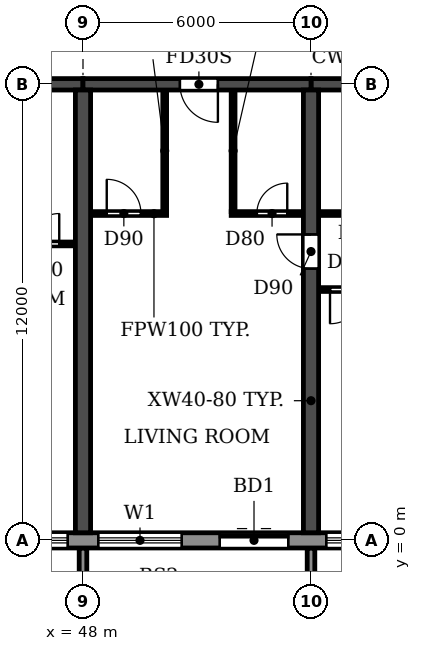
"""IFC4 building model, lengths in metres.
Left out: names, types, materials, properties, quantities, classifications, styles, units other than length and angle.
Written with IfcOpenShell. Run it as: python <this file> out.ifc"""

import sys

from ifc_helpers import new_model, si_unit, direction, frame, frame_2d, origin, place, context, subcontext, project, spatial, polyline, rectangle, outline, extrude, source, transform, mapped, element, fill, save


model = new_model("IFC4")
c1 = context("Model", 3, precision=1e-05, world=origin(), true_north=direction((0.0, 1.0)))
c2 = subcontext(c1, "Body", "Model", "MODEL_VIEW")
j1 = project(units=[si_unit("LENGTHUNIT", "METRE"), si_unit("PLANEANGLEUNIT", "RADIAN")], contexts=[c1])
p1 = place(None, origin())
s1 = spatial("IfcSite", under=j1, at=p1, CompositionType="ELEMENT")
p2 = place(p1, origin())
s2 = spatial("IfcBuilding", under=s1, at=p2, CompositionType="ELEMENT")
p3 = place(p2, frame((0.0, 0.0, 33.3)))
s3 = spatial("IfcBuildingStorey", under=s2, at=p3, CompositionType="ELEMENT", Elevation=33.3)
p4 = place(p3, frame((48.0, 0.2, 0.0), z_axis=(0.0, 0.0, 1.0), x_axis=(0.0, 1.0, 0.0)))
e1 = element("IfcWall", 1, at=p4, inside=s3, PredefinedType="SHEAR", context=c2, shape_type="SweptSolid", body=[
    extrude(rectangle(XDim=11.65, YDim=0.4, at=frame_2d((5.825, 0.0))), origin(), (0.0, 0.0, 1.0), 3.05),
])
p5 = place(p3, frame((54.0, 0.2, 0.0), z_axis=(0.0, 0.0, 1.0), x_axis=(0.0, 1.0, 0.0)))
e2 = element("IfcWall", 2, at=p5, inside=s3, PredefinedType="SHEAR", context=c2, shape_type="SweptSolid", body=[
    extrude(rectangle(XDim=11.65, YDim=0.4, at=frame_2d((5.825, 0.0))), origin(), (0.0, 0.0, 1.0), 3.05),
])
p6 = place(p5, frame((6.95, 0.0, 0.0)))
e3 = element("IfcOpeningElement", 3, at=p6, cuts=e2, PredefinedType="OPENING", context=c2, shape_type="SweptSolid", body=[
    extrude(rectangle(XDim=0.9, YDim=2.1, at=frame_2d((0.45, 1.05))), frame((0.0, 0.21, 0.0), z_axis=(0.0, -1.0, 0.0), x_axis=(1.0, 0.0, 0.0)), (0.0, 0.0, 1.0), 0.42),
])
p7 = place(p3, frame((42.0, 12.0, 0.0), z_axis=(0.0, 0.0, 1.0), x_axis=(1.0, 0.0, 0.0)))
e4 = element("IfcWall", 4, at=p7, inside=s3, PredefinedType="SHEAR", context=c2, shape_type="SweptSolid", body=[
    extrude(rectangle(XDim=6.0, YDim=0.3, at=frame_2d((3.0, 0.0))), origin(), (0.0, 0.0, 1.0), 2.45),
])
p8 = place(p7, frame((2.55, 0.0, 0.0)))
e5 = element("IfcOpeningElement", 5, at=p8, cuts=e4, PredefinedType="OPENING", context=c2, shape_type="SweptSolid", body=[
    extrude(rectangle(XDim=1.0, YDim=2.1, at=frame_2d((0.5, 1.05))), frame((0.0, 0.16, 0.0), z_axis=(0.0, -1.0, 0.0), x_axis=(1.0, 0.0, 0.0)), (0.0, 0.0, 1.0), 0.32),
])
p9 = place(p3, frame((48.0, 12.0, 0.0), z_axis=(0.0, 0.0, 1.0), x_axis=(1.0, 0.0, 0.0)))
e6 = element("IfcWall", 6, at=p9, inside=s3, PredefinedType="SHEAR", context=c2, shape_type="SweptSolid", body=[
    extrude(rectangle(XDim=6.0, YDim=0.3, at=frame_2d((3.0, 0.0))), origin(), (0.0, 0.0, 1.0), 2.45),
])
p10 = place(p9, frame((2.55, 0.0, 0.0)))
e7 = element("IfcOpeningElement", 7, at=p10, cuts=e6, PredefinedType="OPENING", context=c2, shape_type="SweptSolid", body=[
    extrude(rectangle(XDim=1.0, YDim=2.1, at=frame_2d((0.5, 1.05))), frame((0.0, 0.16, 0.0), z_axis=(0.0, -1.0, 0.0), x_axis=(1.0, 0.0, 0.0)), (0.0, 0.0, 1.0), 0.32),
])
p11 = place(p3, frame((54.0, 12.0, 0.0), z_axis=(0.0, 0.0, 1.0), x_axis=(1.0, 0.0, 0.0)))
e8 = element("IfcWall", 8, at=p11, inside=s3, PredefinedType="SHEAR", context=c2, shape_type="SweptSolid", body=[
    extrude(rectangle(XDim=6.0, YDim=0.3, at=frame_2d((3.0, 0.0))), origin(), (0.0, 0.0, 1.0), 2.45),
])
p12 = place(p3, frame((4.683, 0.0, 0.0), z_axis=(0.0, 0.0, 1.0), x_axis=(1.0, 0.0, 0.0)))
e9 = element("IfcWall", 9, at=p12, inside=s3, PredefinedType="STANDARD", context=c2, shape_type="SweptSolid", body=[
    extrude(rectangle(XDim=92.634, YDim=0.4, at=frame_2d((46.317, 0.0))), origin(), (0.0, 0.0, 1.0), 3.05),
])
p13 = place(p12, frame((1.717, 0.0, 0.9)))
e10 = element("IfcOpeningElement", 10, at=p13, cuts=e9, PredefinedType="OPENING", context=c2, shape_type="SweptSolid", body=[
    extrude(rectangle(XDim=2.2, YDim=1.5, at=frame_2d((1.1, 0.75))), frame((0.0, 0.21, 0.0), z_axis=(0.0, -1.0, 0.0), x_axis=(1.0, 0.0, 0.0)), (0.0, 0.0, 1.0), 0.42),
])
p14 = place(p12, frame((4.717, 0.0, 0.9)))
e11 = element("IfcOpeningElement", 11, at=p14, cuts=e9, PredefinedType="OPENING", context=c2, shape_type="SweptSolid", body=[
    extrude(rectangle(XDim=2.2, YDim=1.5, at=frame_2d((1.1, 0.75))), frame((0.0, 0.21, 0.0), z_axis=(0.0, -1.0, 0.0), x_axis=(1.0, 0.0, 0.0)), (0.0, 0.0, 1.0), 0.42),
])
p15 = place(p12, frame((7.917, 0.0, 0.0)))
e12 = element("IfcOpeningElement", 12, at=p15, cuts=e9, PredefinedType="OPENING", context=c2, shape_type="SweptSolid", body=[
    extrude(rectangle(XDim=1.8, YDim=2.4, at=frame_2d((0.9, 1.2))), frame((0.0, 0.21, 0.0), z_axis=(0.0, -1.0, 0.0), x_axis=(1.0, 0.0, 0.0)), (0.0, 0.0, 1.0), 0.42),
])
p16 = place(p12, frame((10.717, 0.0, 0.9)))
e13 = element("IfcOpeningElement", 13, at=p16, cuts=e9, PredefinedType="OPENING", context=c2, shape_type="SweptSolid", body=[
    extrude(rectangle(XDim=2.2, YDim=1.5, at=frame_2d((1.1, 0.75))), frame((0.0, 0.21, 0.0), z_axis=(0.0, -1.0, 0.0), x_axis=(1.0, 0.0, 0.0)), (0.0, 0.0, 1.0), 0.42),
])
p17 = place(p12, frame((13.717, 0.0, 0.9)))
e14 = element("IfcOpeningElement", 14, at=p17, cuts=e9, PredefinedType="OPENING", context=c2, shape_type="SweptSolid", body=[
    extrude(rectangle(XDim=2.2, YDim=1.5, at=frame_2d((1.1, 0.75))), frame((0.0, 0.21, 0.0), z_axis=(0.0, -1.0, 0.0), x_axis=(1.0, 0.0, 0.0)), (0.0, 0.0, 1.0), 0.42),
])
p18 = place(p12, frame((16.717, 0.0, 0.9)))
e15 = element("IfcOpeningElement", 15, at=p18, cuts=e9, PredefinedType="OPENING", context=c2, shape_type="SweptSolid", body=[
    extrude(rectangle(XDim=2.2, YDim=1.5, at=frame_2d((1.1, 0.75))), frame((0.0, 0.21, 0.0), z_axis=(0.0, -1.0, 0.0), x_axis=(1.0, 0.0, 0.0)), (0.0, 0.0, 1.0), 0.42),
])
p19 = place(p12, frame((19.717, 0.0, 0.9)))
e16 = element("IfcOpeningElement", 16, at=p19, cuts=e9, PredefinedType="OPENING", context=c2, shape_type="SweptSolid", body=[
    extrude(rectangle(XDim=2.2, YDim=1.5, at=frame_2d((1.1, 0.75))), frame((0.0, 0.21, 0.0), z_axis=(0.0, -1.0, 0.0), x_axis=(1.0, 0.0, 0.0)), (0.0, 0.0, 1.0), 0.42),
])
p20 = place(p12, frame((22.917, 0.0, 0.0)))
e17 = element("IfcOpeningElement", 17, at=p20, cuts=e9, PredefinedType="OPENING", context=c2, shape_type="SweptSolid", body=[
    extrude(rectangle(XDim=1.8, YDim=2.4, at=frame_2d((0.9, 1.2))), frame((0.0, 0.21, 0.0), z_axis=(0.0, -1.0, 0.0), x_axis=(1.0, 0.0, 0.0)), (0.0, 0.0, 1.0), 0.42),
])
p21 = place(p12, frame((25.717, 0.0, 0.9)))
e18 = element("IfcOpeningElement", 18, at=p21, cuts=e9, PredefinedType="OPENING", context=c2, shape_type="SweptSolid", body=[
    extrude(rectangle(XDim=2.2, YDim=1.5, at=frame_2d((1.1, 0.75))), frame((0.0, 0.21, 0.0), z_axis=(0.0, -1.0, 0.0), x_axis=(1.0, 0.0, 0.0)), (0.0, 0.0, 1.0), 0.42),
])
p22 = place(p12, frame((28.717, 0.0, 0.9)))
e19 = element("IfcOpeningElement", 19, at=p22, cuts=e9, PredefinedType="OPENING", context=c2, shape_type="SweptSolid", body=[
    extrude(rectangle(XDim=2.2, YDim=1.5, at=frame_2d((1.1, 0.75))), frame((0.0, 0.21, 0.0), z_axis=(0.0, -1.0, 0.0), x_axis=(1.0, 0.0, 0.0)), (0.0, 0.0, 1.0), 0.42),
])
p23 = place(p12, frame((31.717, 0.0, 0.9)))
e20 = element("IfcOpeningElement", 20, at=p23, cuts=e9, PredefinedType="OPENING", context=c2, shape_type="SweptSolid", body=[
    extrude(rectangle(XDim=2.2, YDim=1.5, at=frame_2d((1.1, 0.75))), frame((0.0, 0.21, 0.0), z_axis=(0.0, -1.0, 0.0), x_axis=(1.0, 0.0, 0.0)), (0.0, 0.0, 1.0), 0.42),
])
p24 = place(p12, frame((34.717, 0.0, 0.9)))
e21 = element("IfcOpeningElement", 21, at=p24, cuts=e9, PredefinedType="OPENING", context=c2, shape_type="SweptSolid", body=[
    extrude(rectangle(XDim=2.2, YDim=1.5, at=frame_2d((1.1, 0.75))), frame((0.0, 0.21, 0.0), z_axis=(0.0, -1.0, 0.0), x_axis=(1.0, 0.0, 0.0)), (0.0, 0.0, 1.0), 0.42),
])
p25 = place(p12, frame((37.717, 0.0, 0.9)))
e22 = element("IfcOpeningElement", 22, at=p25, cuts=e9, PredefinedType="OPENING", context=c2, shape_type="SweptSolid", body=[
    extrude(rectangle(XDim=2.2, YDim=1.5, at=frame_2d((1.1, 0.75))), frame((0.0, 0.21, 0.0), z_axis=(0.0, -1.0, 0.0), x_axis=(1.0, 0.0, 0.0)), (0.0, 0.0, 1.0), 0.42),
])
p26 = place(p12, frame((40.717, 0.0, 0.9)))
e23 = element("IfcOpeningElement", 23, at=p26, cuts=e9, PredefinedType="OPENING", context=c2, shape_type="SweptSolid", body=[
    extrude(rectangle(XDim=2.2, YDim=1.5, at=frame_2d((1.1, 0.75))), frame((0.0, 0.21, 0.0), z_axis=(0.0, -1.0, 0.0), x_axis=(1.0, 0.0, 0.0)), (0.0, 0.0, 1.0), 0.42),
])
p27 = place(p12, frame((43.717, 0.0, 0.9)))
e24 = element("IfcOpeningElement", 24, at=p27, cuts=e9, PredefinedType="OPENING", context=c2, shape_type="SweptSolid", body=[
    extrude(rectangle(XDim=2.2, YDim=1.5, at=frame_2d((1.1, 0.75))), frame((0.0, 0.21, 0.0), z_axis=(0.0, -1.0, 0.0), x_axis=(1.0, 0.0, 0.0)), (0.0, 0.0, 1.0), 0.42),
])
p28 = place(p12, frame((46.917, 0.0, 0.0)))
e25 = element("IfcOpeningElement", 25, at=p28, cuts=e9, PredefinedType="OPENING", context=c2, shape_type="SweptSolid", body=[
    extrude(rectangle(XDim=1.8, YDim=2.4, at=frame_2d((0.9, 1.2))), frame((0.0, 0.21, 0.0), z_axis=(0.0, -1.0, 0.0), x_axis=(1.0, 0.0, 0.0)), (0.0, 0.0, 1.0), 0.42),
])
p29 = place(p12, frame((49.717, 0.0, 0.9)))
e26 = element("IfcOpeningElement", 26, at=p29, cuts=e9, PredefinedType="OPENING", context=c2, shape_type="SweptSolid", body=[
    extrude(rectangle(XDim=2.2, YDim=1.5, at=frame_2d((1.1, 0.75))), frame((0.0, 0.21, 0.0), z_axis=(0.0, -1.0, 0.0), x_axis=(1.0, 0.0, 0.0)), (0.0, 0.0, 1.0), 0.42),
])
p30 = place(p12, frame((52.717, 0.0, 0.9)))
e27 = element("IfcOpeningElement", 27, at=p30, cuts=e9, PredefinedType="OPENING", context=c2, shape_type="SweptSolid", body=[
    extrude(rectangle(XDim=2.2, YDim=1.5, at=frame_2d((1.1, 0.75))), frame((0.0, 0.21, 0.0), z_axis=(0.0, -1.0, 0.0), x_axis=(1.0, 0.0, 0.0)), (0.0, 0.0, 1.0), 0.42),
])
p31 = place(p12, frame((55.717, 0.0, 0.9)))
e28 = element("IfcOpeningElement", 28, at=p31, cuts=e9, PredefinedType="OPENING", context=c2, shape_type="SweptSolid", body=[
    extrude(rectangle(XDim=2.2, YDim=1.5, at=frame_2d((1.1, 0.75))), frame((0.0, 0.21, 0.0), z_axis=(0.0, -1.0, 0.0), x_axis=(1.0, 0.0, 0.0)), (0.0, 0.0, 1.0), 0.42),
])
p32 = place(p12, frame((58.917, 0.0, 0.0)))
e29 = element("IfcOpeningElement", 29, at=p32, cuts=e9, PredefinedType="OPENING", context=c2, shape_type="SweptSolid", body=[
    extrude(rectangle(XDim=1.8, YDim=2.4, at=frame_2d((0.9, 1.2))), frame((0.0, 0.21, 0.0), z_axis=(0.0, -1.0, 0.0), x_axis=(1.0, 0.0, 0.0)), (0.0, 0.0, 1.0), 0.42),
])
p33 = place(p12, frame((61.717, 0.0, 0.9)))
e30 = element("IfcOpeningElement", 30, at=p33, cuts=e9, PredefinedType="OPENING", context=c2, shape_type="SweptSolid", body=[
    extrude(rectangle(XDim=2.2, YDim=1.5, at=frame_2d((1.1, 0.75))), frame((0.0, 0.21, 0.0), z_axis=(0.0, -1.0, 0.0), x_axis=(1.0, 0.0, 0.0)), (0.0, 0.0, 1.0), 0.42),
])
p34 = place(p12, frame((64.717, 0.0, 0.9)))
e31 = element("IfcOpeningElement", 31, at=p34, cuts=e9, PredefinedType="OPENING", context=c2, shape_type="SweptSolid", body=[
    extrude(rectangle(XDim=2.2, YDim=1.5, at=frame_2d((1.1, 0.75))), frame((0.0, 0.21, 0.0), z_axis=(0.0, -1.0, 0.0), x_axis=(1.0, 0.0, 0.0)), (0.0, 0.0, 1.0), 0.42),
])
p35 = place(p12, frame((67.717, 0.0, 0.9)))
e32 = element("IfcOpeningElement", 32, at=p35, cuts=e9, PredefinedType="OPENING", context=c2, shape_type="SweptSolid", body=[
    extrude(rectangle(XDim=2.2, YDim=1.5, at=frame_2d((1.1, 0.75))), frame((0.0, 0.21, 0.0), z_axis=(0.0, -1.0, 0.0), x_axis=(1.0, 0.0, 0.0)), (0.0, 0.0, 1.0), 0.42),
])
p36 = place(p12, frame((70.917, 0.0, 0.0)))
e33 = element("IfcOpeningElement", 33, at=p36, cuts=e9, PredefinedType="OPENING", context=c2, shape_type="SweptSolid", body=[
    extrude(rectangle(XDim=1.8, YDim=2.4, at=frame_2d((0.9, 1.2))), frame((0.0, 0.21, 0.0), z_axis=(0.0, -1.0, 0.0), x_axis=(1.0, 0.0, 0.0)), (0.0, 0.0, 1.0), 0.42),
])
p37 = place(p12, frame((73.717, 0.0, 0.9)))
e34 = element("IfcOpeningElement", 34, at=p37, cuts=e9, PredefinedType="OPENING", context=c2, shape_type="SweptSolid", body=[
    extrude(rectangle(XDim=2.2, YDim=1.5, at=frame_2d((1.1, 0.75))), frame((0.0, 0.21, 0.0), z_axis=(0.0, -1.0, 0.0), x_axis=(1.0, 0.0, 0.0)), (0.0, 0.0, 1.0), 0.42),
])
p38 = place(p12, frame((76.717, 0.0, 0.9)))
e35 = element("IfcOpeningElement", 35, at=p38, cuts=e9, PredefinedType="OPENING", context=c2, shape_type="SweptSolid", body=[
    extrude(rectangle(XDim=2.2, YDim=1.5, at=frame_2d((1.1, 0.75))), frame((0.0, 0.21, 0.0), z_axis=(0.0, -1.0, 0.0), x_axis=(1.0, 0.0, 0.0)), (0.0, 0.0, 1.0), 0.42),
])
p39 = place(p12, frame((79.717, 0.0, 0.9)))
e36 = element("IfcOpeningElement", 36, at=p39, cuts=e9, PredefinedType="OPENING", context=c2, shape_type="SweptSolid", body=[
    extrude(rectangle(XDim=2.2, YDim=1.5, at=frame_2d((1.1, 0.75))), frame((0.0, 0.21, 0.0), z_axis=(0.0, -1.0, 0.0), x_axis=(1.0, 0.0, 0.0)), (0.0, 0.0, 1.0), 0.42),
])
p40 = place(p12, frame((82.717, 0.0, 0.9)))
e37 = element("IfcOpeningElement", 37, at=p40, cuts=e9, PredefinedType="OPENING", context=c2, shape_type="SweptSolid", body=[
    extrude(rectangle(XDim=2.2, YDim=1.5, at=frame_2d((1.1, 0.75))), frame((0.0, 0.21, 0.0), z_axis=(0.0, -1.0, 0.0), x_axis=(1.0, 0.0, 0.0)), (0.0, 0.0, 1.0), 0.42),
])
p41 = place(p12, frame((85.717, 0.0, 0.9)))
e38 = element("IfcOpeningElement", 38, at=p41, cuts=e9, PredefinedType="OPENING", context=c2, shape_type="SweptSolid", body=[
    extrude(rectangle(XDim=2.2, YDim=1.5, at=frame_2d((1.1, 0.75))), frame((0.0, 0.21, 0.0), z_axis=(0.0, -1.0, 0.0), x_axis=(1.0, 0.0, 0.0)), (0.0, 0.0, 1.0), 0.42),
])
p42 = place(p12, frame((88.717, 0.0, 0.9)))
e39 = element("IfcOpeningElement", 39, at=p42, cuts=e9, PredefinedType="OPENING", context=c2, shape_type="SweptSolid", body=[
    extrude(rectangle(XDim=2.2, YDim=1.5, at=frame_2d((1.1, 0.75))), frame((0.0, 0.21, 0.0), z_axis=(0.0, -1.0, 0.0), x_axis=(1.0, 0.0, 0.0)), (0.0, 0.0, 1.0), 0.42),
])
m1 = source(origin(), c2, "Body", "SweptSolid", [
    extrude(outline(polyline([(0.0, 0.0), (0.2, 0.0), (0.2, 1.65), (0.0, 1.65), (0.0, 0.0)])), origin(), (0.0, 0.0, 1.0), 3.1),
])
for number, where in (
    (40, (47.9, -1.85, 0.0)),
    (41, (53.9, -1.85, 0.0)),
):
    element("IfcWall", number, at=place(p3, frame(where)), inside=s3, PredefinedType="STANDARD", context=c2, shape_type="MappedRepresentation", body=[
        mapped(m1, transform((0.0, 0.0, 0.0))),
    ])
p43 = place(p3, frame((54.21, 6.6, 0.0), z_axis=(0.0, 0.0, 1.0), x_axis=(1.0, 0.0, 0.0)))
e42 = element("IfcWall", 42, at=p43, inside=s3, PredefinedType="PARTITIONING", context=c2, shape_type="SweptSolid", body=[
    extrude(rectangle(XDim=2.69, YDim=0.1, at=frame_2d((1.345, 0.0))), origin(), (0.0, 0.0, 1.0), 3.05),
])
p44 = place(p43, frame((0.29, 0.0, 0.0)))
e43 = element("IfcOpeningElement", 43, at=p44, cuts=e42, PredefinedType="OPENING", context=c2, shape_type="SweptSolid", body=[
    extrude(rectangle(XDim=0.9, YDim=2.1, at=frame_2d((0.45, 1.05))), frame((0.0, 0.06, 0.0), z_axis=(0.0, -1.0, 0.0), x_axis=(1.0, 0.0, 0.0)), (0.0, 0.0, 1.0), 0.12),
])
p45 = place(p3, frame((45.9, 7.8, 0.0), z_axis=(0.0, 0.0, 1.0), x_axis=(1.0, 0.0, 0.0)))
e44 = element("IfcWall", 44, at=p45, inside=s3, PredefinedType="PARTITIONING", context=c2, shape_type="SweptSolid", body=[
    extrude(rectangle(XDim=1.89, YDim=0.1, at=frame_2d((0.945, 0.0))), origin(), (0.0, 0.0, 1.0), 3.05),
])
p46 = place(p45, frame((0.675, 0.0, 0.0)))
e45 = element("IfcOpeningElement", 45, at=p46, cuts=e44, PredefinedType="OPENING", context=c2, shape_type="SweptSolid", body=[
    extrude(rectangle(XDim=0.8, YDim=2.1, at=frame_2d((0.4, 1.05))), frame((0.0, 0.06, 0.0), z_axis=(0.0, -1.0, 0.0), x_axis=(1.0, 0.0, 0.0)), (0.0, 0.0, 1.0), 0.12),
])
p47 = place(p3, frame((48.21, 8.6, 0.0), z_axis=(0.0, 0.0, 1.0), x_axis=(1.0, 0.0, 0.0)))
e46 = element("IfcWall", 46, at=p47, inside=s3, PredefinedType="PARTITIONING", context=c2, shape_type="SweptSolid", body=[
    extrude(rectangle(XDim=1.99, YDim=0.1, at=frame_2d((0.995, 0.0))), origin(), (0.0, 0.0, 1.0), 3.05),
])
p48 = place(p47, frame((0.415, 0.0, 0.0)))
e47 = element("IfcOpeningElement", 47, at=p48, cuts=e46, PredefinedType="OPENING", context=c2, shape_type="SweptSolid", body=[
    extrude(rectangle(XDim=0.9, YDim=2.1, at=frame_2d((0.45, 1.05))), frame((0.0, 0.06, 0.0), z_axis=(0.0, -1.0, 0.0), x_axis=(1.0, 0.0, 0.0)), (0.0, 0.0, 1.0), 0.12),
])
p49 = place(p3, frame((51.9, 8.6, 0.0), z_axis=(0.0, 0.0, 1.0), x_axis=(1.0, 0.0, 0.0)))
e48 = element("IfcWall", 48, at=p49, inside=s3, PredefinedType="PARTITIONING", context=c2, shape_type="SweptSolid", body=[
    extrude(rectangle(XDim=1.89, YDim=0.1, at=frame_2d((0.945, 0.0))), origin(), (0.0, 0.0, 1.0), 3.05),
])
p50 = place(p49, frame((0.675, 0.0, 0.0)))
e49 = element("IfcOpeningElement", 49, at=p50, cuts=e48, PredefinedType="OPENING", context=c2, shape_type="SweptSolid", body=[
    extrude(rectangle(XDim=0.8, YDim=2.1, at=frame_2d((0.4, 1.05))), frame((0.0, 0.06, 0.0), z_axis=(0.0, -1.0, 0.0), x_axis=(1.0, 0.0, 0.0)), (0.0, 0.0, 1.0), 0.12),
])
p51 = place(p3, frame((54.21, 8.6, 0.0), z_axis=(0.0, 0.0, 1.0), x_axis=(1.0, 0.0, 0.0)))
e50 = element("IfcWall", 50, at=p51, inside=s3, PredefinedType="PARTITIONING", context=c2, shape_type="SweptSolid", body=[
    extrude(rectangle(XDim=2.69, YDim=0.1, at=frame_2d((1.345, 0.0))), origin(), (0.0, 0.0, 1.0), 3.05),
])
p52 = place(p51, frame((0.89, 0.0, 0.0)))
e51 = element("IfcOpeningElement", 51, at=p52, cuts=e50, PredefinedType="OPENING", context=c2, shape_type="SweptSolid", body=[
    extrude(rectangle(XDim=0.8, YDim=2.1, at=frame_2d((0.4, 1.05))), frame((0.0, 0.06, 0.0), z_axis=(0.0, -1.0, 0.0), x_axis=(1.0, 0.0, 0.0)), (0.0, 0.0, 1.0), 0.12),
])
for number, where, z_axis, x_axis in (
    (52, (50.15, 8.65, 0.0), (0.0, 0.0, 1.0), (0.0, 1.0, 0.0)),
    (53, (51.95, 8.65, 0.0), (0.0, 0.0, 1.0), (0.0, 1.0, 0.0)),
):
    element("IfcWall", number, at=place(p3, frame(where, z_axis=z_axis, x_axis=x_axis)), inside=s3, PredefinedType="PARTITIONING", context=c2, shape_type="SweptSolid", body=[
        extrude(rectangle(XDim=3.19, YDim=0.1, at=frame_2d((1.595, 0.0))), origin(), (0.0, 0.0, 1.0), 3.05),
    ])
p53 = place(p26, origin())
e54 = element("IfcWindow", 54, at=p53, inside=s3, PartitioningType="DOUBLE_PANEL_HORIZONTAL", PredefinedType="WINDOW", context=c2, shape_type="SweptSolid", body=[
    extrude(rectangle(XDim=2.2, YDim=1.5, at=frame_2d((1.1, 0.75))), frame((0.0, 0.03, 0.0), z_axis=(0.0, -1.0, 0.0), x_axis=(1.0, 0.0, 0.0)), (0.0, 0.0, 1.0), 0.06),
])
fill(e23, e54)
p54 = place(p27, origin())
e55 = element("IfcWindow", 55, at=p54, inside=s3, PartitioningType="DOUBLE_PANEL_HORIZONTAL", PredefinedType="WINDOW", context=c2, shape_type="SweptSolid", body=[
    extrude(rectangle(XDim=2.2, YDim=1.5, at=frame_2d((1.1, 0.75))), frame((0.0, 0.03, 0.0), z_axis=(0.0, -1.0, 0.0), x_axis=(1.0, 0.0, 0.0)), (0.0, 0.0, 1.0), 0.06),
])
fill(e24, e55)
p55 = place(p28, origin())
e56 = element("IfcDoor", 56, at=p55, inside=s3, OperationType="DOUBLE_DOOR_SLIDING", PredefinedType="DOOR", context=c2, shape_type="SweptSolid", body=[
    extrude(rectangle(XDim=1.8, YDim=2.4, at=frame_2d((0.9, 1.2))), frame((0.0, 0.025, 0.0), z_axis=(0.0, -1.0, 0.0), x_axis=(1.0, 0.0, 0.0)), (0.0, 0.0, 1.0), 0.05),
])
fill(e25, e56)
p56 = place(p29, origin())
e57 = element("IfcWindow", 57, at=p56, inside=s3, PartitioningType="DOUBLE_PANEL_HORIZONTAL", PredefinedType="WINDOW", context=c2, shape_type="SweptSolid", body=[
    extrude(rectangle(XDim=2.2, YDim=1.5, at=frame_2d((1.1, 0.75))), frame((0.0, 0.03, 0.0), z_axis=(0.0, -1.0, 0.0), x_axis=(1.0, 0.0, 0.0)), (0.0, 0.0, 1.0), 0.06),
])
fill(e26, e57)
p57 = place(p46, origin())
e58 = element("IfcDoor", 58, at=p57, inside=s3, OperationType="SINGLE_SWING_RIGHT", PredefinedType="DOOR", context=c2, shape_type="SweptSolid", body=[
    extrude(rectangle(XDim=0.8, YDim=2.1, at=frame_2d((0.4, 1.05))), frame((0.0, 0.025, 0.0), z_axis=(0.0, -1.0, 0.0), x_axis=(1.0, 0.0, 0.0)), (0.0, 0.0, 1.0), 0.05),
])
fill(e45, e58)
p58 = place(p44, frame((0.9, 0.0, 0.0), z_axis=(0.0, 0.0, 1.0), x_axis=(-1.0, 0.0, 0.0)))
e59 = element("IfcDoor", 59, at=p58, inside=s3, OperationType="SINGLE_SWING_RIGHT", PredefinedType="DOOR", context=c2, shape_type="SweptSolid", body=[
    extrude(rectangle(XDim=0.9, YDim=2.1, at=frame_2d((0.45, 1.05))), frame((0.0, 0.025, 0.0), z_axis=(0.0, -1.0, 0.0), x_axis=(1.0, 0.0, 0.0)), (0.0, 0.0, 1.0), 0.05),
])
fill(e43, e59)
p59 = place(p48, origin())
e60 = element("IfcDoor", 60, at=p59, inside=s3, OperationType="SINGLE_SWING_LEFT", PredefinedType="DOOR", context=c2, shape_type="SweptSolid", body=[
    extrude(rectangle(XDim=0.9, YDim=2.1, at=frame_2d((0.45, 1.05))), frame((0.0, 0.025, 0.0), z_axis=(0.0, -1.0, 0.0), x_axis=(1.0, 0.0, 0.0)), (0.0, 0.0, 1.0), 0.05),
])
fill(e47, e60)
p60 = place(p10, frame((1.0, 0.0, 0.0), z_axis=(0.0, 0.0, 1.0), x_axis=(-1.0, 0.0, 0.0)))
e61 = element("IfcDoor", 61, at=p60, inside=s3, OperationType="SINGLE_SWING_LEFT", PredefinedType="DOOR", context=c2, shape_type="SweptSolid", body=[
    extrude(rectangle(XDim=1.0, YDim=2.1, at=frame_2d((0.5, 1.05))), frame((0.0, 0.025, 0.0), z_axis=(0.0, -1.0, 0.0), x_axis=(1.0, 0.0, 0.0)), (0.0, 0.0, 1.0), 0.05),
])
fill(e7, e61)
p61 = place(p50, origin())
e62 = element("IfcDoor", 62, at=p61, inside=s3, OperationType="SINGLE_SWING_RIGHT", PredefinedType="DOOR", context=c2, shape_type="SweptSolid", body=[
    extrude(rectangle(XDim=0.8, YDim=2.1, at=frame_2d((0.4, 1.05))), frame((0.0, 0.025, 0.0), z_axis=(0.0, -1.0, 0.0), x_axis=(1.0, 0.0, 0.0)), (0.0, 0.0, 1.0), 0.05),
])
fill(e49, e62)
p62 = place(p6, origin())
e63 = element("IfcDoor", 63, at=p62, inside=s3, OperationType="SINGLE_SWING_RIGHT", PredefinedType="DOOR", context=c2, shape_type="SweptSolid", body=[
    extrude(rectangle(XDim=0.9, YDim=2.1, at=frame_2d((0.45, 1.05))), frame((0.0, 0.025, 0.0), z_axis=(0.0, -1.0, 0.0), x_axis=(1.0, 0.0, 0.0)), (0.0, 0.0, 1.0), 0.05),
])
fill(e3, e63)
save(model, sys.argv[1])
